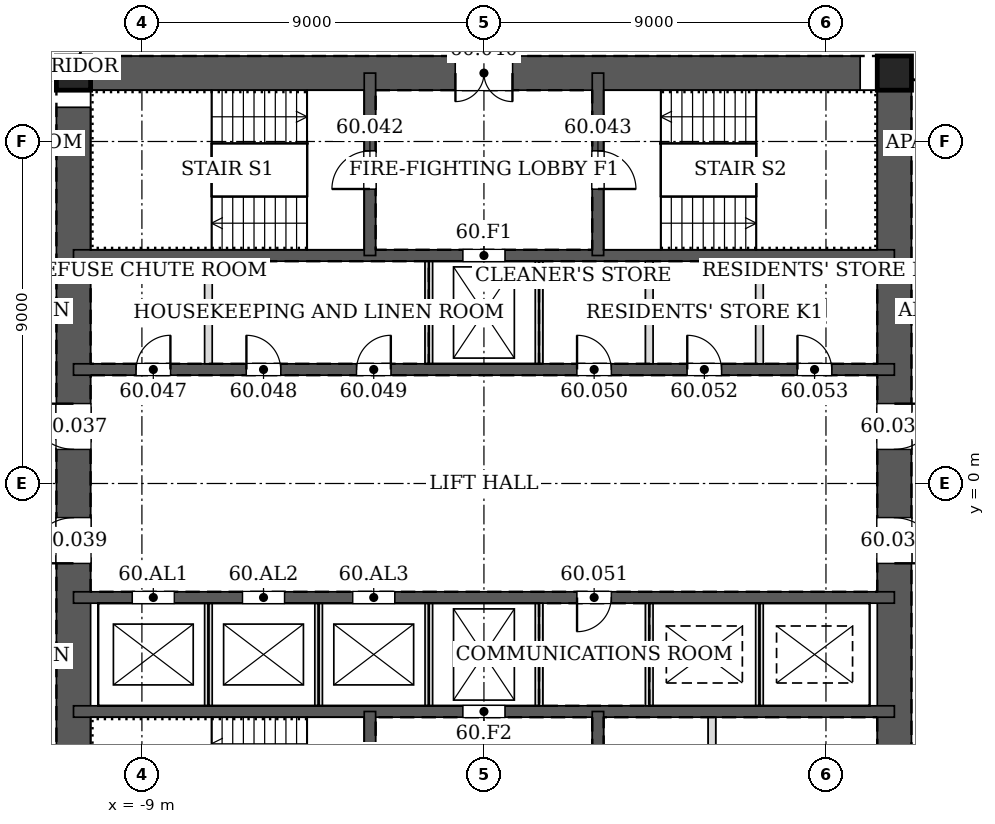
"""IFC4 building model, lengths in metres.
Left out: names, types, materials, properties, quantities, classifications, styles, units other than length and angle.
Written with IfcOpenShell. Run it as: python <this file> out.ifc"""

import sys

from ifc_helpers import new_model, si_unit, direction, frame, frame_2d, origin, origin_2d, place, context, subcontext, project, spatial, rectangle, hollow_rectangle, extrude, element, fill, save


model = new_model("IFC4")
c1 = context("Model", 3, precision=1e-05, world=origin(), true_north=direction((0.0, 1.0)))
c2 = subcontext(c1, "Body", "Model", "MODEL_VIEW")
j1 = project(units=[si_unit("LENGTHUNIT", "METRE"), si_unit("PLANEANGLEUNIT", "RADIAN")], contexts=[c1])
p1 = place(None, origin())
s1 = spatial("IfcSite", under=j1, at=p1, CompositionType="ELEMENT")
p2 = place(p1, origin())
s2 = spatial("IfcBuilding", under=s1, at=p2, CompositionType="ELEMENT")
p3 = place(p2, frame((0.0, 0.0, 251.6)))
s3 = spatial("IfcBuildingStorey", under=s2, at=p3, CompositionType="ELEMENT", Elevation=251.6)
for number, where, z_axis, x_axis in (
    (1, (10.8, 10.8, 0.0), (0.0, 0.0, 1.0), (1.0, 0.0, 0.0)),
    (2, (-10.8, 10.8, 0.0), (0.0, 0.0, 1.0), (1.0, 0.0, 0.0)),
):
    element("IfcColumn", number, at=place(p3, frame(where, z_axis=z_axis, x_axis=x_axis)), inside=s3, PredefinedType="COLUMN", context=c2, shape_type="SweptSolid", body=[
        extrude(hollow_rectangle(XDim=0.9, YDim=0.9, WallThickness=0.04, at=origin_2d()), origin(), (0.0, 0.0, 1.0), 3.4),
    ])
p4 = place(p3, frame((10.8, -10.8, 0.0), z_axis=(0.0, 0.0, 1.0), x_axis=(0.0, 1.0, 0.0)))
e3 = element("IfcWall", 3, at=p4, inside=s3, PredefinedType="SOLIDWALL", context=c2, shape_type="SweptSolid", body=[
    extrude(rectangle(XDim=21.6, YDim=0.9, at=frame_2d((10.8, 0.0))), origin(), (0.0, 0.0, 1.0), 3.4),
])
p5 = place(p4, frame((11.7, 0.0, 0.0)))
e4 = element("IfcOpeningElement", 4, at=p5, cuts=e3, PredefinedType="OPENING", context=c2, shape_type="SweptSolid", body=[
    extrude(rectangle(XDim=1.2, YDim=2.1, at=frame_2d((0.6, 1.05))), frame((0.0, 0.46, 0.0), z_axis=(0.0, -1.0, 0.0), x_axis=(1.0, 0.0, 0.0)), (0.0, 0.0, 1.0), 0.92),
])
p6 = place(p4, frame((8.7, 0.0, 0.0)))
e5 = element("IfcOpeningElement", 5, at=p6, cuts=e3, PredefinedType="OPENING", context=c2, shape_type="SweptSolid", body=[
    extrude(rectangle(XDim=1.2, YDim=2.1, at=frame_2d((0.6, 1.05))), frame((0.0, 0.46, 0.0), z_axis=(0.0, -1.0, 0.0), x_axis=(1.0, 0.0, 0.0)), (0.0, 0.0, 1.0), 0.92),
])
p7 = place(p3, frame((10.8, 10.8, 0.0), z_axis=(0.0, 0.0, 1.0), x_axis=(-1.0, 0.0, 0.0)))
e6 = element("IfcWall", 6, at=p7, inside=s3, PredefinedType="SOLIDWALL", context=c2, shape_type="SweptSolid", body=[
    extrude(rectangle(XDim=21.6, YDim=0.9, at=frame_2d((10.8, 0.0))), origin(), (0.0, 0.0, 1.0), 3.4),
])
p8 = place(p7, frame((10.05, 0.0, 0.0)))
e7 = element("IfcOpeningElement", 7, at=p8, cuts=e6, PredefinedType="OPENING", context=c2, shape_type="SweptSolid", body=[
    extrude(rectangle(XDim=1.5, YDim=2.1, at=frame_2d((0.75, 1.05))), frame((0.0, 0.46, 0.0), z_axis=(0.0, -1.0, 0.0), x_axis=(1.0, 0.0, 0.0)), (0.0, 0.0, 1.0), 0.92),
])
p9 = place(p3, frame((-10.8, 10.8, 0.0), z_axis=(0.0, 0.0, 1.0), x_axis=(0.0, -1.0, 0.0)))
e8 = element("IfcWall", 8, at=p9, inside=s3, PredefinedType="SOLIDWALL", context=c2, shape_type="SweptSolid", body=[
    extrude(rectangle(XDim=21.6, YDim=0.9, at=frame_2d((10.8, 0.0))), origin(), (0.0, 0.0, 1.0), 3.4),
])
p10 = place(p9, frame((8.7, 0.0, 0.0)))
e9 = element("IfcOpeningElement", 9, at=p10, cuts=e8, PredefinedType="OPENING", context=c2, shape_type="SweptSolid", body=[
    extrude(rectangle(XDim=1.2, YDim=2.1, at=frame_2d((0.6, 1.05))), frame((0.0, 0.46, 0.0), z_axis=(0.0, -1.0, 0.0), x_axis=(1.0, 0.0, 0.0)), (0.0, 0.0, 1.0), 0.92),
])
p11 = place(p9, frame((11.7, 0.0, 0.0)))
e10 = element("IfcOpeningElement", 10, at=p11, cuts=e8, PredefinedType="OPENING", context=c2, shape_type="SweptSolid", body=[
    extrude(rectangle(XDim=1.2, YDim=2.1, at=frame_2d((0.6, 1.05))), frame((0.0, 0.46, 0.0), z_axis=(0.0, -1.0, 0.0), x_axis=(1.0, 0.0, 0.0)), (0.0, 0.0, 1.0), 0.92),
])
p12 = place(p3, frame((-10.8, 3.0, 0.0), z_axis=(0.0, 0.0, 1.0), x_axis=(1.0, 0.0, 0.0)))
e11 = element("IfcWall", 11, at=p12, inside=s3, PredefinedType="SOLIDWALL", context=c2, shape_type="SweptSolid", body=[
    extrude(rectangle(XDim=21.6, YDim=0.3, at=frame_2d((10.8, 0.0))), origin(), (0.0, 0.0, 1.0), 3.4),
])
p13 = place(p12, frame((1.65, 0.0, 0.0)))
e12 = element("IfcOpeningElement", 12, at=p13, cuts=e11, PredefinedType="OPENING", context=c2, shape_type="SweptSolid", body=[
    extrude(rectangle(XDim=0.9, YDim=2.1, at=frame_2d((0.45, 1.05))), frame((0.0, 0.16, 0.0), z_axis=(0.0, -1.0, 0.0), x_axis=(1.0, 0.0, 0.0)), (0.0, 0.0, 1.0), 0.32),
])
p14 = place(p12, frame((4.55, 0.0, 0.0)))
e13 = element("IfcOpeningElement", 13, at=p14, cuts=e11, PredefinedType="OPENING", context=c2, shape_type="SweptSolid", body=[
    extrude(rectangle(XDim=0.9, YDim=2.1, at=frame_2d((0.45, 1.05))), frame((0.0, 0.16, 0.0), z_axis=(0.0, -1.0, 0.0), x_axis=(1.0, 0.0, 0.0)), (0.0, 0.0, 1.0), 0.32),
])
p15 = place(p12, frame((7.45, 0.0, 0.0)))
e14 = element("IfcOpeningElement", 14, at=p15, cuts=e11, PredefinedType="OPENING", context=c2, shape_type="SweptSolid", body=[
    extrude(rectangle(XDim=0.9, YDim=2.1, at=frame_2d((0.45, 1.05))), frame((0.0, 0.16, 0.0), z_axis=(0.0, -1.0, 0.0), x_axis=(1.0, 0.0, 0.0)), (0.0, 0.0, 1.0), 0.32),
])
p16 = place(p12, frame((13.25, 0.0, 0.0)))
e15 = element("IfcOpeningElement", 15, at=p16, cuts=e11, PredefinedType="OPENING", context=c2, shape_type="SweptSolid", body=[
    extrude(rectangle(XDim=0.9, YDim=2.1, at=frame_2d((0.45, 1.05))), frame((0.0, 0.16, 0.0), z_axis=(0.0, -1.0, 0.0), x_axis=(1.0, 0.0, 0.0)), (0.0, 0.0, 1.0), 0.32),
])
p17 = place(p12, frame((16.15, 0.0, 0.0)))
e16 = element("IfcOpeningElement", 16, at=p17, cuts=e11, PredefinedType="OPENING", context=c2, shape_type="SweptSolid", body=[
    extrude(rectangle(XDim=0.9, YDim=2.1, at=frame_2d((0.45, 1.05))), frame((0.0, 0.16, 0.0), z_axis=(0.0, -1.0, 0.0), x_axis=(1.0, 0.0, 0.0)), (0.0, 0.0, 1.0), 0.32),
])
p18 = place(p12, frame((19.05, 0.0, 0.0)))
e17 = element("IfcOpeningElement", 17, at=p18, cuts=e11, PredefinedType="OPENING", context=c2, shape_type="SweptSolid", body=[
    extrude(rectangle(XDim=0.9, YDim=2.1, at=frame_2d((0.45, 1.05))), frame((0.0, 0.16, 0.0), z_axis=(0.0, -1.0, 0.0), x_axis=(1.0, 0.0, 0.0)), (0.0, 0.0, 1.0), 0.32),
])
p19 = place(p3, frame((-10.8, 6.0, 0.0), z_axis=(0.0, 0.0, 1.0), x_axis=(1.0, 0.0, 0.0)))
e18 = element("IfcWall", 18, at=p19, inside=s3, PredefinedType="SOLIDWALL", context=c2, shape_type="SweptSolid", body=[
    extrude(rectangle(XDim=21.6, YDim=0.3, at=frame_2d((10.8, 0.0))), origin(), (0.0, 0.0, 1.0), 3.4),
])
p20 = place(p19, frame((10.25, 0.0, 0.0)))
e19 = element("IfcOpeningElement", 19, at=p20, cuts=e18, PredefinedType="OPENING", context=c2, shape_type="SweptSolid", body=[
    extrude(rectangle(XDim=1.1, YDim=2.1, at=frame_2d((0.55, 1.05))), frame((0.0, 0.16, 0.0), z_axis=(0.0, -1.0, 0.0), x_axis=(1.0, 0.0, 0.0)), (0.0, 0.0, 1.0), 0.32),
])
p21 = place(p3, frame((-3.0, 6.0, 0.0), z_axis=(0.0, 0.0, 1.0), x_axis=(0.0, 1.0, 0.0)))
e20 = element("IfcWall", 20, at=p21, inside=s3, PredefinedType="SOLIDWALL", context=c2, shape_type="SweptSolid", body=[
    extrude(rectangle(XDim=4.8, YDim=0.3, at=frame_2d((2.4, 0.0))), origin(), (0.0, 0.0, 1.0), 3.4),
])
p22 = place(p21, frame((1.75, 0.0, 0.0)))
e21 = element("IfcOpeningElement", 21, at=p22, cuts=e20, PredefinedType="OPENING", context=c2, shape_type="SweptSolid", body=[
    extrude(rectangle(XDim=1.0, YDim=2.1, at=frame_2d((0.5, 1.05))), frame((0.0, 0.16, 0.0), z_axis=(0.0, -1.0, 0.0), x_axis=(1.0, 0.0, 0.0)), (0.0, 0.0, 1.0), 0.32),
])
p23 = place(p3, frame((3.0, 6.0, 0.0), z_axis=(0.0, 0.0, 1.0), x_axis=(0.0, 1.0, 0.0)))
e22 = element("IfcWall", 22, at=p23, inside=s3, PredefinedType="SOLIDWALL", context=c2, shape_type="SweptSolid", body=[
    extrude(rectangle(XDim=4.8, YDim=0.3, at=frame_2d((2.4, 0.0))), origin(), (0.0, 0.0, 1.0), 3.4),
])
p24 = place(p23, frame((1.75, 0.0, 0.0)))
e23 = element("IfcOpeningElement", 23, at=p24, cuts=e22, PredefinedType="OPENING", context=c2, shape_type="SweptSolid", body=[
    extrude(rectangle(XDim=1.0, YDim=2.1, at=frame_2d((0.5, 1.05))), frame((0.0, 0.16, 0.0), z_axis=(0.0, -1.0, 0.0), x_axis=(1.0, 0.0, 0.0)), (0.0, 0.0, 1.0), 0.32),
])
p25 = place(p3, frame((-10.8, -3.0, 0.0), z_axis=(0.0, 0.0, 1.0), x_axis=(1.0, 0.0, 0.0)))
e24 = element("IfcWall", 24, at=p25, inside=s3, PredefinedType="SOLIDWALL", context=c2, shape_type="SweptSolid", body=[
    extrude(rectangle(XDim=21.6, YDim=0.3, at=frame_2d((10.8, 0.0))), origin(), (0.0, 0.0, 1.0), 3.4),
])
p26 = place(p25, frame((13.25, 0.0, 0.0)))
e25 = element("IfcOpeningElement", 25, at=p26, cuts=e24, PredefinedType="OPENING", context=c2, shape_type="SweptSolid", body=[
    extrude(rectangle(XDim=0.9, YDim=2.1, at=frame_2d((0.45, 1.05))), frame((0.0, 0.16, 0.0), z_axis=(0.0, -1.0, 0.0), x_axis=(1.0, 0.0, 0.0)), (0.0, 0.0, 1.0), 0.32),
])
p27 = place(p25, frame((1.55, 0.0, 0.0)))
e26 = element("IfcOpeningElement", 26, at=p27, cuts=e24, PredefinedType="OPENING", context=c2, shape_type="SweptSolid", body=[
    extrude(rectangle(XDim=1.1, YDim=2.1, at=frame_2d((0.55, 1.05))), frame((0.0, 0.16, 0.0), z_axis=(0.0, -1.0, 0.0), x_axis=(1.0, 0.0, 0.0)), (0.0, 0.0, 1.0), 0.32),
])
p28 = place(p25, frame((4.45, 0.0, 0.0)))
e27 = element("IfcOpeningElement", 27, at=p28, cuts=e24, PredefinedType="OPENING", context=c2, shape_type="SweptSolid", body=[
    extrude(rectangle(XDim=1.1, YDim=2.1, at=frame_2d((0.55, 1.05))), frame((0.0, 0.16, 0.0), z_axis=(0.0, -1.0, 0.0), x_axis=(1.0, 0.0, 0.0)), (0.0, 0.0, 1.0), 0.32),
])
p29 = place(p25, frame((7.35, 0.0, 0.0)))
e28 = element("IfcOpeningElement", 28, at=p29, cuts=e24, PredefinedType="OPENING", context=c2, shape_type="SweptSolid", body=[
    extrude(rectangle(XDim=1.1, YDim=2.1, at=frame_2d((0.55, 1.05))), frame((0.0, 0.16, 0.0), z_axis=(0.0, -1.0, 0.0), x_axis=(1.0, 0.0, 0.0)), (0.0, 0.0, 1.0), 0.32),
])
p30 = place(p3, frame((-10.8, -6.0, 0.0), z_axis=(0.0, 0.0, 1.0), x_axis=(1.0, 0.0, 0.0)))
e29 = element("IfcWall", 29, at=p30, inside=s3, PredefinedType="SOLIDWALL", context=c2, shape_type="SweptSolid", body=[
    extrude(rectangle(XDim=21.6, YDim=0.3, at=frame_2d((10.8, 0.0))), origin(), (0.0, 0.0, 1.0), 3.4),
])
p31 = place(p30, frame((10.25, 0.0, 0.0)))
e30 = element("IfcOpeningElement", 30, at=p31, cuts=e29, PredefinedType="OPENING", context=c2, shape_type="SweptSolid", body=[
    extrude(rectangle(XDim=1.1, YDim=2.1, at=frame_2d((0.55, 1.05))), frame((0.0, 0.16, 0.0), z_axis=(0.0, -1.0, 0.0), x_axis=(1.0, 0.0, 0.0)), (0.0, 0.0, 1.0), 0.32),
])
p32 = place(p3, frame((-3.0, -6.0, 0.0), z_axis=(0.0, 0.0, 1.0), x_axis=(0.0, -1.0, 0.0)))
e31 = element("IfcWall", 31, at=p32, inside=s3, PredefinedType="SOLIDWALL", context=c2, shape_type="SweptSolid", body=[
    extrude(rectangle(XDim=4.8, YDim=0.3, at=frame_2d((2.4, 0.0))), origin(), (0.0, 0.0, 1.0), 3.4),
])
p33 = place(p32, frame((1.75, 0.0, 0.0)))
e32 = element("IfcOpeningElement", 32, at=p33, cuts=e31, PredefinedType="OPENING", context=c2, shape_type="SweptSolid", body=[
    extrude(rectangle(XDim=1.0, YDim=2.1, at=frame_2d((0.5, 1.05))), frame((0.0, 0.16, 0.0), z_axis=(0.0, -1.0, 0.0), x_axis=(1.0, 0.0, 0.0)), (0.0, 0.0, 1.0), 0.32),
])
p34 = place(p3, frame((3.0, -6.0, 0.0), z_axis=(0.0, 0.0, 1.0), x_axis=(0.0, -1.0, 0.0)))
e33 = element("IfcWall", 33, at=p34, inside=s3, PredefinedType="SOLIDWALL", context=c2, shape_type="SweptSolid", body=[
    extrude(rectangle(XDim=4.8, YDim=0.3, at=frame_2d((2.4, 0.0))), origin(), (0.0, 0.0, 1.0), 3.4),
])
for number, where, z_axis, x_axis in (
    (34, (-7.25, 3.15, 0.0), (0.0, 0.0, 1.0), (0.0, 1.0, 0.0)),
    (35, (-1.45, 3.15, 0.0), (0.0, 0.0, 1.0), (0.0, 1.0, 0.0)),
    (36, (1.45, 3.15, 0.0), (0.0, 0.0, 1.0), (0.0, 1.0, 0.0)),
    (37, (4.35, 3.15, 0.0), (0.0, 0.0, 1.0), (0.0, 1.0, 0.0)),
    (38, (7.25, 3.15, 0.0), (0.0, 0.0, 1.0), (0.0, 1.0, 0.0)),
):
    element("IfcWall", number, at=place(p3, frame(where, z_axis=z_axis, x_axis=x_axis)), inside=s3, PredefinedType="PARTITIONING", context=c2, shape_type="SweptSolid", body=[
        extrude(rectangle(XDim=2.7, YDim=0.2, at=frame_2d((1.35, 0.0))), origin(), (0.0, 0.0, 1.0), 3.2),
    ])
for number, where, z_axis, x_axis in (
    (39, (-7.25, -5.85, 0.0), (0.0, 0.0, 1.0), (0.0, 1.0, 0.0)),
    (40, (-4.35, -5.85, 0.0), (0.0, 0.0, 1.0), (0.0, 1.0, 0.0)),
    (41, (-1.45, -5.85, 0.0), (0.0, 0.0, 1.0), (0.0, 1.0, 0.0)),
):
    element("IfcWall", number, at=place(p3, frame(where, z_axis=z_axis, x_axis=x_axis)), inside=s3, PredefinedType="PARTITIONING", context=c2, shape_type="SweptSolid", body=[
        extrude(rectangle(XDim=2.7, YDim=0.2, at=frame_2d((1.35, 0.0))), origin(), (0.0, 0.0, 1.0), 3.4),
    ])
for number, where, z_axis, x_axis in (
    (42, (1.45, -5.85, 0.0), (0.0, 0.0, 1.0), (0.0, 1.0, 0.0)),
    (43, (4.35, -5.85, 0.0), (0.0, 0.0, 1.0), (0.0, 1.0, 0.0)),
):
    element("IfcWall", number, at=place(p3, frame(where, z_axis=z_axis, x_axis=x_axis)), inside=s3, PredefinedType="PARTITIONING", context=c2, shape_type="SweptSolid", body=[
        extrude(rectangle(XDim=2.7, YDim=0.2, at=frame_2d((1.35, 0.0))), origin(), (0.0, 0.0, 1.0), 3.2),
    ])
p35 = place(p3, frame((7.25, -5.85, 0.0), z_axis=(0.0, 0.0, 1.0), x_axis=(0.0, 1.0, 0.0)))
e44 = element("IfcWall", 44, at=p35, inside=s3, PredefinedType="PARTITIONING", context=c2, shape_type="SweptSolid", body=[
    extrude(rectangle(XDim=2.7, YDim=0.2, at=frame_2d((1.35, 0.0))), origin(), (0.0, 0.0, 1.0), 3.4),
])
p36 = place(p3, frame((6.0, -10.35, 0.0), z_axis=(0.0, 0.0, 1.0), x_axis=(0.0, 1.0, 0.0)))
e45 = element("IfcWall", 45, at=p36, inside=s3, PredefinedType="PARTITIONING", context=c2, shape_type="SweptSolid", body=[
    extrude(rectangle(XDim=4.2, YDim=0.2, at=frame_2d((2.1, 0.0))), origin(), (0.0, 0.0, 1.0), 3.2),
])
p37 = place(p36, frame((0.3, 0.0, 0.0)))
e46 = element("IfcOpeningElement", 46, at=p37, cuts=e45, PredefinedType="OPENING", context=c2, shape_type="SweptSolid", body=[
    extrude(rectangle(XDim=0.9, YDim=2.1, at=frame_2d((0.45, 1.05))), frame((0.0, 0.11, 0.0), z_axis=(0.0, -1.0, 0.0), x_axis=(1.0, 0.0, 0.0)), (0.0, 0.0, 1.0), 0.22),
])
p38 = place(p5, frame((1.2, 0.0, 0.0), z_axis=(0.0, 0.0, 1.0), x_axis=(-1.0, 0.0, 0.0)))
e47 = element("IfcDoor", 47, at=p38, inside=s3, OperationType="SINGLE_SWING_LEFT", PredefinedType="DOOR", context=c2, shape_type="SweptSolid", body=[
    extrude(rectangle(XDim=1.2, YDim=2.1, at=frame_2d((0.6, 1.05))), frame((0.0, 0.025, 0.0), z_axis=(0.0, -1.0, 0.0), x_axis=(1.0, 0.0, 0.0)), (0.0, 0.0, 1.0), 0.05),
])
fill(e4, e47)
p39 = place(p10, frame((1.2, 0.0, 0.0), z_axis=(0.0, 0.0, 1.0), x_axis=(-1.0, 0.0, 0.0)))
e48 = element("IfcDoor", 48, at=p39, inside=s3, OperationType="SINGLE_SWING_RIGHT", PredefinedType="DOOR", context=c2, shape_type="SweptSolid", body=[
    extrude(rectangle(XDim=1.2, YDim=2.1, at=frame_2d((0.6, 1.05))), frame((0.0, 0.025, 0.0), z_axis=(0.0, -1.0, 0.0), x_axis=(1.0, 0.0, 0.0)), (0.0, 0.0, 1.0), 0.05),
])
fill(e9, e48)
p40 = place(p6, frame((1.2, 0.0, 0.0), z_axis=(0.0, 0.0, 1.0), x_axis=(-1.0, 0.0, 0.0)))
e49 = element("IfcDoor", 49, at=p40, inside=s3, OperationType="SINGLE_SWING_RIGHT", PredefinedType="DOOR", context=c2, shape_type="SweptSolid", body=[
    extrude(rectangle(XDim=1.2, YDim=2.1, at=frame_2d((0.6, 1.05))), frame((0.0, 0.025, 0.0), z_axis=(0.0, -1.0, 0.0), x_axis=(1.0, 0.0, 0.0)), (0.0, 0.0, 1.0), 0.05),
])
fill(e5, e49)
p41 = place(p11, frame((1.2, 0.0, 0.0), z_axis=(0.0, 0.0, 1.0), x_axis=(-1.0, 0.0, 0.0)))
e50 = element("IfcDoor", 50, at=p41, inside=s3, OperationType="SINGLE_SWING_LEFT", PredefinedType="DOOR", context=c2, shape_type="SweptSolid", body=[
    extrude(rectangle(XDim=1.2, YDim=2.1, at=frame_2d((0.6, 1.05))), frame((0.0, 0.025, 0.0), z_axis=(0.0, -1.0, 0.0), x_axis=(1.0, 0.0, 0.0)), (0.0, 0.0, 1.0), 0.05),
])
fill(e10, e50)
p42 = place(p8, origin())
e51 = element("IfcDoor", 51, at=p42, inside=s3, OperationType="DOUBLE_DOOR_SINGLE_SWING", PredefinedType="DOOR", context=c2, shape_type="SweptSolid", body=[
    extrude(rectangle(XDim=1.5, YDim=2.1, at=frame_2d((0.75, 1.05))), frame((0.0, 0.025, 0.0), z_axis=(0.0, -1.0, 0.0), x_axis=(1.0, 0.0, 0.0)), (0.0, 0.0, 1.0), 0.05),
])
fill(e7, e51)
p43 = place(p22, origin())
e52 = element("IfcDoor", 52, at=p43, inside=s3, OperationType="SINGLE_SWING_LEFT", PredefinedType="DOOR", context=c2, shape_type="SweptSolid", body=[
    extrude(rectangle(XDim=1.0, YDim=2.1, at=frame_2d((0.5, 1.05))), frame((0.0, 0.025, 0.0), z_axis=(0.0, -1.0, 0.0), x_axis=(1.0, 0.0, 0.0)), (0.0, 0.0, 1.0), 0.05),
])
fill(e21, e52)
p44 = place(p24, frame((1.0, 0.0, 0.0), z_axis=(0.0, 0.0, 1.0), x_axis=(-1.0, 0.0, 0.0)))
e53 = element("IfcDoor", 53, at=p44, inside=s3, OperationType="SINGLE_SWING_RIGHT", PredefinedType="DOOR", context=c2, shape_type="SweptSolid", body=[
    extrude(rectangle(XDim=1.0, YDim=2.1, at=frame_2d((0.5, 1.05))), frame((0.0, 0.025, 0.0), z_axis=(0.0, -1.0, 0.0), x_axis=(1.0, 0.0, 0.0)), (0.0, 0.0, 1.0), 0.05),
])
fill(e23, e53)
p45 = place(p13, origin())
e54 = element("IfcDoor", 54, at=p45, inside=s3, OperationType="SINGLE_SWING_RIGHT", PredefinedType="DOOR", context=c2, shape_type="SweptSolid", body=[
    extrude(rectangle(XDim=0.9, YDim=2.1, at=frame_2d((0.45, 1.05))), frame((0.0, 0.025, 0.0), z_axis=(0.0, -1.0, 0.0), x_axis=(1.0, 0.0, 0.0)), (0.0, 0.0, 1.0), 0.05),
])
fill(e12, e54)
p46 = place(p14, origin())
e55 = element("IfcDoor", 55, at=p46, inside=s3, OperationType="SINGLE_SWING_LEFT", PredefinedType="DOOR", context=c2, shape_type="SweptSolid", body=[
    extrude(rectangle(XDim=0.9, YDim=2.1, at=frame_2d((0.45, 1.05))), frame((0.0, 0.025, 0.0), z_axis=(0.0, -1.0, 0.0), x_axis=(1.0, 0.0, 0.0)), (0.0, 0.0, 1.0), 0.05),
])
fill(e13, e55)
p47 = place(p15, origin())
e56 = element("IfcDoor", 56, at=p47, inside=s3, OperationType="SINGLE_SWING_RIGHT", PredefinedType="DOOR", context=c2, shape_type="SweptSolid", body=[
    extrude(rectangle(XDim=0.9, YDim=2.1, at=frame_2d((0.45, 1.05))), frame((0.0, 0.025, 0.0), z_axis=(0.0, -1.0, 0.0), x_axis=(1.0, 0.0, 0.0)), (0.0, 0.0, 1.0), 0.05),
])
fill(e14, e56)
p48 = place(p16, origin())
e57 = element("IfcDoor", 57, at=p48, inside=s3, OperationType="SINGLE_SWING_LEFT", PredefinedType="DOOR", context=c2, shape_type="SweptSolid", body=[
    extrude(rectangle(XDim=0.9, YDim=2.1, at=frame_2d((0.45, 1.05))), frame((0.0, 0.025, 0.0), z_axis=(0.0, -1.0, 0.0), x_axis=(1.0, 0.0, 0.0)), (0.0, 0.0, 1.0), 0.05),
])
fill(e15, e57)
p49 = place(p26, frame((0.9, 0.0, 0.0), z_axis=(0.0, 0.0, 1.0), x_axis=(-1.0, 0.0, 0.0)))
e58 = element("IfcDoor", 58, at=p49, inside=s3, OperationType="SINGLE_SWING_RIGHT", PredefinedType="DOOR", context=c2, shape_type="SweptSolid", body=[
    extrude(rectangle(XDim=0.9, YDim=2.1, at=frame_2d((0.45, 1.05))), frame((0.0, 0.025, 0.0), z_axis=(0.0, -1.0, 0.0), x_axis=(1.0, 0.0, 0.0)), (0.0, 0.0, 1.0), 0.05),
])
fill(e25, e58)
p50 = place(p17, origin())
e59 = element("IfcDoor", 59, at=p50, inside=s3, OperationType="SINGLE_SWING_LEFT", PredefinedType="DOOR", context=c2, shape_type="SweptSolid", body=[
    extrude(rectangle(XDim=0.9, YDim=2.1, at=frame_2d((0.45, 1.05))), frame((0.0, 0.025, 0.0), z_axis=(0.0, -1.0, 0.0), x_axis=(1.0, 0.0, 0.0)), (0.0, 0.0, 1.0), 0.05),
])
fill(e16, e59)
p51 = place(p18, origin())
e60 = element("IfcDoor", 60, at=p51, inside=s3, OperationType="SINGLE_SWING_LEFT", PredefinedType="DOOR", context=c2, shape_type="SweptSolid", body=[
    extrude(rectangle(XDim=0.9, YDim=2.1, at=frame_2d((0.45, 1.05))), frame((0.0, 0.025, 0.0), z_axis=(0.0, -1.0, 0.0), x_axis=(1.0, 0.0, 0.0)), (0.0, 0.0, 1.0), 0.05),
])
fill(e17, e60)
p52 = place(p20, origin())
e61 = element("IfcDoor", 61, at=p52, inside=s3, OperationType="DOUBLE_DOOR_SLIDING", PredefinedType="DOOR", context=c2, shape_type="SweptSolid", body=[
    extrude(rectangle(XDim=1.1, YDim=2.1, at=frame_2d((0.55, 1.05))), frame((0.0, 0.025, 0.0), z_axis=(0.0, -1.0, 0.0), x_axis=(1.0, 0.0, 0.0)), (0.0, 0.0, 1.0), 0.05),
])
fill(e19, e61)
p53 = place(p31, origin())
e62 = element("IfcDoor", 62, at=p53, inside=s3, OperationType="DOUBLE_DOOR_SLIDING", PredefinedType="DOOR", context=c2, shape_type="SweptSolid", body=[
    extrude(rectangle(XDim=1.1, YDim=2.1, at=frame_2d((0.55, 1.05))), frame((0.0, 0.025, 0.0), z_axis=(0.0, -1.0, 0.0), x_axis=(1.0, 0.0, 0.0)), (0.0, 0.0, 1.0), 0.05),
])
fill(e30, e62)
p54 = place(p27, origin())
e63 = element("IfcDoor", 63, at=p54, inside=s3, OperationType="DOUBLE_DOOR_SLIDING", PredefinedType="DOOR", context=c2, shape_type="SweptSolid", body=[
    extrude(rectangle(XDim=1.1, YDim=2.1, at=frame_2d((0.55, 1.05))), frame((0.0, 0.025, 0.0), z_axis=(0.0, -1.0, 0.0), x_axis=(1.0, 0.0, 0.0)), (0.0, 0.0, 1.0), 0.05),
])
fill(e26, e63)
p55 = place(p28, origin())
e64 = element("IfcDoor", 64, at=p55, inside=s3, OperationType="DOUBLE_DOOR_SLIDING", PredefinedType="DOOR", context=c2, shape_type="SweptSolid", body=[
    extrude(rectangle(XDim=1.1, YDim=2.1, at=frame_2d((0.55, 1.05))), frame((0.0, 0.025, 0.0), z_axis=(0.0, -1.0, 0.0), x_axis=(1.0, 0.0, 0.0)), (0.0, 0.0, 1.0), 0.05),
])
fill(e27, e64)
p56 = place(p29, origin())
e65 = element("IfcDoor", 65, at=p56, inside=s3, OperationType="DOUBLE_DOOR_SLIDING", PredefinedType="DOOR", context=c2, shape_type="SweptSolid", body=[
    extrude(rectangle(XDim=1.1, YDim=2.1, at=frame_2d((0.55, 1.05))), frame((0.0, 0.025, 0.0), z_axis=(0.0, -1.0, 0.0), x_axis=(1.0, 0.0, 0.0)), (0.0, 0.0, 1.0), 0.05),
])
fill(e28, e65)
save(model, sys.argv[1])
